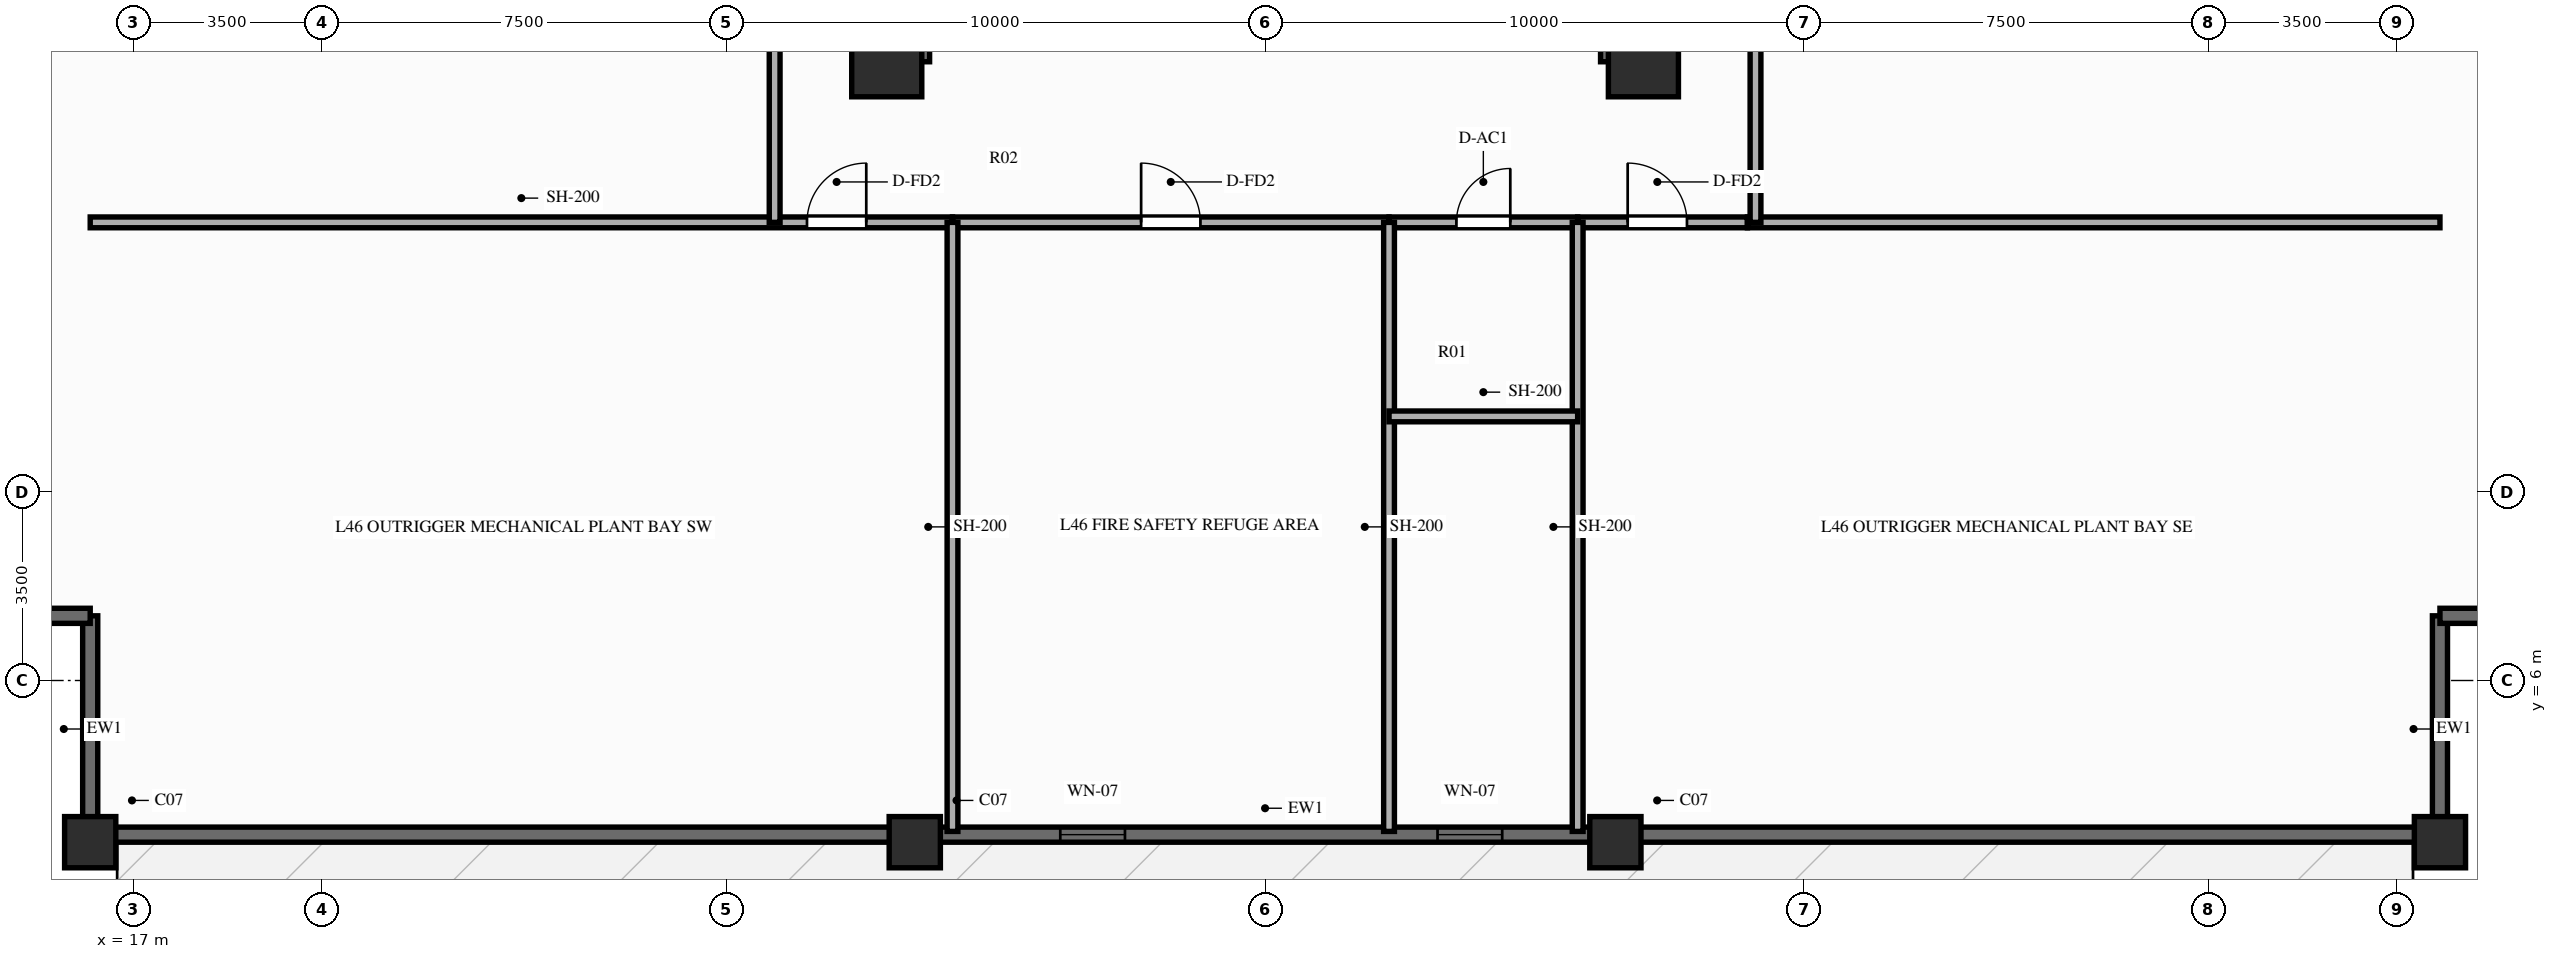
"""IFC4 building model, lengths in metres.
Left out: names, types, materials, properties, quantities, classifications, styles, units other than length and angle.
Written with IfcOpenShell. Run it as: python <this file> out.ifc"""

import sys

from ifc_helpers import new_model, si_unit, direction, frame, frame_2d, origin, origin_2d, place, context, subcontext, project, spatial, rectangle, extrude, source, transform, mapped, element, fill, save


model = new_model("IFC4")
c1 = context("Model", 3, precision=1e-05, world=origin(), true_north=direction((0.0, 1.0)))
c2 = subcontext(c1, "Body", "Model", "MODEL_VIEW")
j1 = project(units=[si_unit("LENGTHUNIT", "METRE"), si_unit("PLANEANGLEUNIT", "RADIAN")], contexts=[c1])
p1 = place(None, origin())
s1 = spatial("IfcSite", under=j1, at=p1, CompositionType="ELEMENT")
p2 = place(p1, origin())
s2 = spatial("IfcBuilding", under=s1, at=p2, CompositionType="ELEMENT")
p3 = place(p2, frame((0.0, 0.0, 144.75)))
s3 = spatial("IfcBuildingStorey", under=s2, at=p3, CompositionType="ELEMENT", Elevation=144.75)
p4 = place(p3, frame((31.5, 17.48, 0.0), z_axis=(0.0, 0.0, 1.0), x_axis=(0.0, 1.0, 0.0)))
e1 = element("IfcWall", 1, at=p4, inside=s3, PredefinedType="SHEAR", context=c2, shape_type="SweptSolid", body=[
    extrude(rectangle(XDim=19.04, YDim=0.55, at=frame_2d((9.52, 0.0))), origin(), (0.0, 0.0, 1.0), 3.95),
])
p5 = place(p4, frame((6.32, 0.0, 0.0)))
e2 = element("IfcOpeningElement", 2, at=p5, cuts=e1, PredefinedType="OPENING", context=c2, shape_type="SweptSolid", body=[
    extrude(rectangle(XDim=1.1, YDim=2.15, at=frame_2d((0.55, 1.075))), frame((0.0, 0.287, 0.0), z_axis=(0.0, -1.0, 0.0), x_axis=(1.0, 0.0, 0.0)), (0.0, 0.0, 1.0), 0.574),
])
p6 = place(p3, frame((44.5, 17.48, 0.0), z_axis=(0.0, 0.0, 1.0), x_axis=(0.0, 1.0, 0.0)))
e3 = element("IfcWall", 3, at=p6, inside=s3, PredefinedType="SHEAR", context=c2, shape_type="SweptSolid", body=[
    extrude(rectangle(XDim=19.04, YDim=0.55, at=frame_2d((9.52, 0.0))), origin(), (0.0, 0.0, 1.0), 3.95),
])
p7 = place(p6, frame((12.67, 0.0, 0.0), z_axis=(0.0, 0.0, 1.0), x_axis=(-1.0, 0.0, 0.0)))
e4 = element("IfcOpeningElement", 4, at=p7, cuts=e3, PredefinedType="OPENING", context=c2, shape_type="SweptSolid", body=[
    extrude(rectangle(XDim=1.1, YDim=2.15, at=frame_2d((0.55, 1.075))), frame((0.0, 0.287, 0.0), z_axis=(0.0, -1.0, 0.0), x_axis=(1.0, 0.0, 0.0)), (0.0, 0.0, 1.0), 0.574),
])
m1 = source(origin(), c2, "Body", "SweptSolid", [
    extrude(rectangle(XDim=1.3, YDim=1.3, at=origin_2d()), origin(), (0.0, 0.0, 1.0), 3.95),
])
for number, where, z_axis, x_axis in (
    (5, (30.98, 17.48, 0.0), (0.0, 0.0, 1.0), (1.0, 0.0, 0.0)),
    (6, (45.02, 17.48, 0.0), (0.0, 0.0, 1.0), (1.0, 0.0, 0.0)),
):
    element("IfcColumn", number, at=place(p3, frame(where, z_axis=z_axis, x_axis=x_axis)), inside=s3, PredefinedType="COLUMN", context=c2, shape_type="MappedRepresentation", body=[
        mapped(m1, transform((0.0, 0.0, 0.0), scale=1.0)),
    ])
m2 = source(origin(), c2, "Body", "SweptSolid", [
    extrude(rectangle(XDim=0.95, YDim=0.95, at=origin_2d()), origin(), (0.0, 0.0, 1.0), 3.95),
])
for number, where, z_axis, x_axis in (
    (7, (16.2, 3.0, 0.0), (0.0, 0.0, 1.0), (1.0, 0.0, 0.0)),
    (8, (31.5, 3.0, 0.0), (0.0, 0.0, 1.0), (1.0, 0.0, 0.0)),
    (9, (44.5, 3.0, 0.0), (0.0, 0.0, 1.0), (1.0, 0.0, 0.0)),
    (10, (59.8, 3.0, 0.0), (0.0, 0.0, 1.0), (1.0, 0.0, 0.0)),
):
    element("IfcColumn", number, at=place(p3, frame(where, z_axis=z_axis, x_axis=x_axis)), inside=s3, PredefinedType="COLUMN", context=c2, shape_type="MappedRepresentation", body=[
        mapped(m2, transform((0.0, 0.0, 0.0), scale=1.0)),
    ])
p8 = place(p3, frame((16.2, 3.14, 0.0), z_axis=(0.0, 0.0, 1.0), x_axis=(1.0, 0.0, 0.0)))
e11 = element("IfcWall", 11, at=p8, inside=s3, PredefinedType="SOLIDWALL", context=c2, shape_type="SweptSolid", body=[
    extrude(rectangle(XDim=43.6, YDim=0.28, at=frame_2d((21.8, 0.0))), origin(), (0.0, 0.0, 1.0), 2.29),
])
p9 = place(p8, frame((18.0, 0.0, 0.45)))
e12 = element("IfcOpeningElement", 12, at=p9, cuts=e11, PredefinedType="OPENING", context=c2, shape_type="SweptSolid", body=[
    extrude(rectangle(XDim=1.2, YDim=0.9, at=frame_2d((0.6, 0.45))), frame((0.0, 0.152, 0.0), z_axis=(0.0, -1.0, 0.0), x_axis=(1.0, 0.0, 0.0)), (0.0, 0.0, 1.0), 0.304),
])
p10 = place(p8, frame((25.0, 0.0, 0.45)))
e13 = element("IfcOpeningElement", 13, at=p10, cuts=e11, PredefinedType="OPENING", context=c2, shape_type="SweptSolid", body=[
    extrude(rectangle(XDim=1.2, YDim=0.9, at=frame_2d((0.6, 0.45))), frame((0.0, 0.152, 0.0), z_axis=(0.0, -1.0, 0.0), x_axis=(1.0, 0.0, 0.0)), (0.0, 0.0, 1.0), 0.304),
])
for number, where, z_axis, x_axis in (
    (14, (16.2, 3.0, 0.0), (0.0, 0.0, 1.0), (0.0, 1.0, 0.0)),
    (15, (12.0, 7.2, 0.0), (0.0, 0.0, 1.0), (1.0, 0.0, 0.0)),
    (16, (59.8, 3.0, 0.0), (0.0, 0.0, 1.0), (0.0, 1.0, 0.0)),
    (17, (59.8, 7.2, 0.0), (0.0, 0.0, 1.0), (1.0, 0.0, 0.0)),
):
    element("IfcWall", number, at=place(p3, frame(where, z_axis=z_axis, x_axis=x_axis)), inside=s3, PredefinedType="SOLIDWALL", context=c2, shape_type="SweptSolid", body=[
        extrude(rectangle(XDim=4.2, YDim=0.28, at=frame_2d((2.1, 0.0))), origin(), (0.0, 0.0, 1.0), 2.29),
    ])
p11 = place(p3, frame((16.2, 14.5, 0.0), z_axis=(0.0, 0.0, 1.0), x_axis=(1.0, 0.0, 0.0)))
e18 = element("IfcWall", 18, at=p11, inside=s3, PredefinedType="PARTITIONING", context=c2, shape_type="SweptSolid", body=[
    extrude(rectangle(XDim=16.0, YDim=0.2, at=frame_2d((8.0, 0.0))), origin(), (0.0, 0.0, 1.0), 3.61),
])
p12 = place(p11, frame((13.3, 0.0, 0.0)))
e19 = element("IfcOpeningElement", 19, at=p12, cuts=e18, PredefinedType="OPENING", context=c2, shape_type="SweptSolid", body=[
    extrude(rectangle(XDim=1.1, YDim=2.15, at=frame_2d((0.55, 1.075))), frame((0.0, 0.112, 0.0), z_axis=(0.0, -1.0, 0.0), x_axis=(1.0, 0.0, 0.0)), (0.0, 0.0, 1.0), 0.224),
])
p13 = place(p3, frame((32.2, 14.5, 0.0), z_axis=(0.0, 0.0, 1.0), x_axis=(1.0, 0.0, 0.0)))
e20 = element("IfcWall", 20, at=p13, inside=s3, PredefinedType="PARTITIONING", context=c2, shape_type="SweptSolid", body=[
    extrude(rectangle(XDim=8.1, YDim=0.2, at=frame_2d((4.05, 0.0))), origin(), (0.0, 0.0, 1.0), 3.61),
])
p14 = place(p13, frame((3.5, 0.0, 0.0)))
e21 = element("IfcOpeningElement", 21, at=p14, cuts=e20, PredefinedType="OPENING", context=c2, shape_type="SweptSolid", body=[
    extrude(rectangle(XDim=1.1, YDim=2.15, at=frame_2d((0.55, 1.075))), frame((0.0, 0.112, 0.0), z_axis=(0.0, -1.0, 0.0), x_axis=(1.0, 0.0, 0.0)), (0.0, 0.0, 1.0), 0.224),
])
p15 = place(p3, frame((40.3, 14.5, 0.0), z_axis=(0.0, 0.0, 1.0), x_axis=(1.0, 0.0, 0.0)))
e22 = element("IfcWall", 22, at=p15, inside=s3, PredefinedType="PARTITIONING", context=c2, shape_type="SweptSolid", body=[
    extrude(rectangle(XDim=3.5, YDim=0.2, at=frame_2d((1.75, 0.0))), origin(), (0.0, 0.0, 1.0), 3.61),
])
p16 = place(p15, frame((1.25, 0.0, 0.0)))
e23 = element("IfcOpeningElement", 23, at=p16, cuts=e22, PredefinedType="OPENING", context=c2, shape_type="SweptSolid", body=[
    extrude(rectangle(XDim=1.0, YDim=2.1, at=frame_2d((0.5, 1.05))), frame((0.0, 0.112, 0.0), z_axis=(0.0, -1.0, 0.0), x_axis=(1.0, 0.0, 0.0)), (0.0, 0.0, 1.0), 0.224),
])
p17 = place(p3, frame((43.8, 14.5, 0.0), z_axis=(0.0, 0.0, 1.0), x_axis=(1.0, 0.0, 0.0)))
e24 = element("IfcWall", 24, at=p17, inside=s3, PredefinedType="PARTITIONING", context=c2, shape_type="SweptSolid", body=[
    extrude(rectangle(XDim=3.15, YDim=0.2, at=frame_2d((1.575, 0.0))), origin(), (0.0, 0.0, 1.0), 3.61),
])
p18 = place(p17, frame((0.928, 0.0, 0.0)))
e25 = element("IfcOpeningElement", 25, at=p18, cuts=e24, PredefinedType="OPENING", context=c2, shape_type="SweptSolid", body=[
    extrude(rectangle(XDim=1.1, YDim=2.15, at=frame_2d((0.55, 1.075))), frame((0.0, 0.112, 0.0), z_axis=(0.0, -1.0, 0.0), x_axis=(1.0, 0.0, 0.0)), (0.0, 0.0, 1.0), 0.224),
])
p19 = place(p3, frame((46.95, 14.5, 0.0), z_axis=(0.0, 0.0, 1.0), x_axis=(1.0, 0.0, 0.0)))
e26 = element("IfcWall", 26, at=p19, inside=s3, PredefinedType="PARTITIONING", context=c2, shape_type="SweptSolid", body=[
    extrude(rectangle(XDim=12.85, YDim=0.2, at=frame_2d((6.425, 0.0))), origin(), (0.0, 0.0, 1.0), 3.61),
])
for number, where, z_axis, x_axis in (
    (27, (32.2, 3.2, 0.0), (0.0, 0.0, 1.0), (0.0, 1.0, 0.0)),
    (28, (40.3, 3.2, 0.0), (0.0, 0.0, 1.0), (0.0, 1.0, 0.0)),
    (29, (43.8, 3.2, 0.0), (0.0, 0.0, 1.0), (0.0, 1.0, 0.0)),
):
    element("IfcWall", number, at=place(p3, frame(where, z_axis=z_axis, x_axis=x_axis)), inside=s3, PredefinedType="PARTITIONING", context=c2, shape_type="SweptSolid", body=[
        extrude(rectangle(XDim=11.3, YDim=0.2, at=frame_2d((5.65, 0.0))), origin(), (0.0, 0.0, 1.0), 3.61),
    ])
p20 = place(p3, frame((40.3, 10.9, 0.0), z_axis=(0.0, 0.0, 1.0), x_axis=(1.0, 0.0, 0.0)))
e30 = element("IfcWall", 30, at=p20, inside=s3, PredefinedType="PARTITIONING", context=c2, shape_type="SweptSolid", body=[
    extrude(rectangle(XDim=3.5, YDim=0.2, at=frame_2d((1.75, 0.0))), origin(), (0.0, 0.0, 1.0), 3.61),
])
p21 = place(p3, frame((28.9, 14.5, 0.0), z_axis=(0.0, 0.0, 1.0), x_axis=(0.0, 1.0, 0.0)))
e31 = element("IfcWall", 31, at=p21, inside=s3, PredefinedType="PARTITIONING", context=c2, shape_type="SweptSolid", body=[
    extrude(rectangle(XDim=24.8, YDim=0.2, at=frame_2d((12.4, 0.0))), origin(), (0.0, 0.0, 1.0), 3.61),
])
p22 = place(p21, frame((11.85, 0.0, 0.0)))
e32 = element("IfcOpeningElement", 32, at=p22, cuts=e31, PredefinedType="OPENING", context=c2, shape_type="SweptSolid", body=[
    extrude(rectangle(XDim=1.1, YDim=2.15, at=frame_2d((0.55, 1.075))), frame((0.0, 0.112, 0.0), z_axis=(0.0, -1.0, 0.0), x_axis=(1.0, 0.0, 0.0)), (0.0, 0.0, 1.0), 0.224),
])
p23 = place(p3, frame((47.1, 14.5, 0.0), z_axis=(0.0, 0.0, 1.0), x_axis=(0.0, 1.0, 0.0)))
e33 = element("IfcWall", 33, at=p23, inside=s3, PredefinedType="PARTITIONING", context=c2, shape_type="SweptSolid", body=[
    extrude(rectangle(XDim=24.8, YDim=0.2, at=frame_2d((12.4, 0.0))), origin(), (0.0, 0.0, 1.0), 3.61),
])
p24 = place(p23, frame((11.85, 0.0, 0.0)))
e34 = element("IfcOpeningElement", 34, at=p24, cuts=e33, PredefinedType="OPENING", context=c2, shape_type="SweptSolid", body=[
    extrude(rectangle(XDim=1.1, YDim=2.15, at=frame_2d((0.55, 1.075))), frame((0.0, 0.112, 0.0), z_axis=(0.0, -1.0, 0.0), x_axis=(1.0, 0.0, 0.0)), (0.0, 0.0, 1.0), 0.224),
])
m3 = source(origin(), c2, "Body", "SweptSolid", [
    extrude(rectangle(XDim=1.2, YDim=0.9, at=frame_2d((0.6, 0.45))), frame((0.0, 0.03, 0.0), z_axis=(0.0, -1.0, 0.0), x_axis=(1.0, 0.0, 0.0)), (0.0, 0.0, 1.0), 0.06),
])
p25 = place(p9, origin())
e35 = element("IfcWindow", 35, at=p25, inside=s3, PartitioningType="SINGLE_PANEL", PredefinedType="WINDOW", context=c2, shape_type="MappedRepresentation", body=[
    mapped(m3, transform((0.0, 0.0, 0.0), scale=1.0)),
])
fill(e12, e35)
p26 = place(p10, origin())
e36 = element("IfcWindow", 36, at=p26, inside=s3, PartitioningType="SINGLE_PANEL", PredefinedType="WINDOW", context=c2, shape_type="MappedRepresentation", body=[
    mapped(m3, transform((0.0, 0.0, 0.0), scale=1.0)),
])
fill(e13, e36)
m4 = source(origin(), c2, "Body", "SweptSolid", [
    extrude(rectangle(XDim=1.1, YDim=2.15, at=frame_2d((0.55, 1.075))), frame((0.0, 0.025, 0.0), z_axis=(0.0, -1.0, 0.0), x_axis=(1.0, 0.0, 0.0)), (0.0, 0.0, 1.0), 0.05),
])
p27 = place(p12, origin())
e37 = element("IfcDoor", 37, at=p27, inside=s3, OperationType="SINGLE_SWING_RIGHT", PredefinedType="DOOR", context=c2, shape_type="MappedRepresentation", body=[
    mapped(m4, transform((0.0, 0.0, 0.0), scale=1.0)),
])
fill(e19, e37)
p28 = place(p14, origin())
e38 = element("IfcDoor", 38, at=p28, inside=s3, OperationType="SINGLE_SWING_LEFT", PredefinedType="DOOR", context=c2, shape_type="MappedRepresentation", body=[
    mapped(m4, transform((0.0, 0.0, 0.0), scale=1.0)),
])
fill(e21, e38)
m5 = source(origin(), c2, "Body", "SweptSolid", [
    extrude(rectangle(XDim=1.0, YDim=2.1, at=frame_2d((0.5, 1.05))), frame((0.0, 0.025, 0.0), z_axis=(0.0, -1.0, 0.0), x_axis=(1.0, 0.0, 0.0)), (0.0, 0.0, 1.0), 0.05),
])
p29 = place(p16, origin())
e39 = element("IfcDoor", 39, at=p29, inside=s3, OperationType="SINGLE_SWING_RIGHT", PredefinedType="DOOR", context=c2, shape_type="MappedRepresentation", body=[
    mapped(m5, transform((0.0, 0.0, 0.0), scale=1.0)),
])
fill(e23, e39)
p30 = place(p18, origin())
e40 = element("IfcDoor", 40, at=p30, inside=s3, OperationType="SINGLE_SWING_LEFT", PredefinedType="DOOR", context=c2, shape_type="MappedRepresentation", body=[
    mapped(m4, transform((0.0, 0.0, 0.0), scale=1.0)),
])
fill(e25, e40)
save(model, sys.argv[1])
